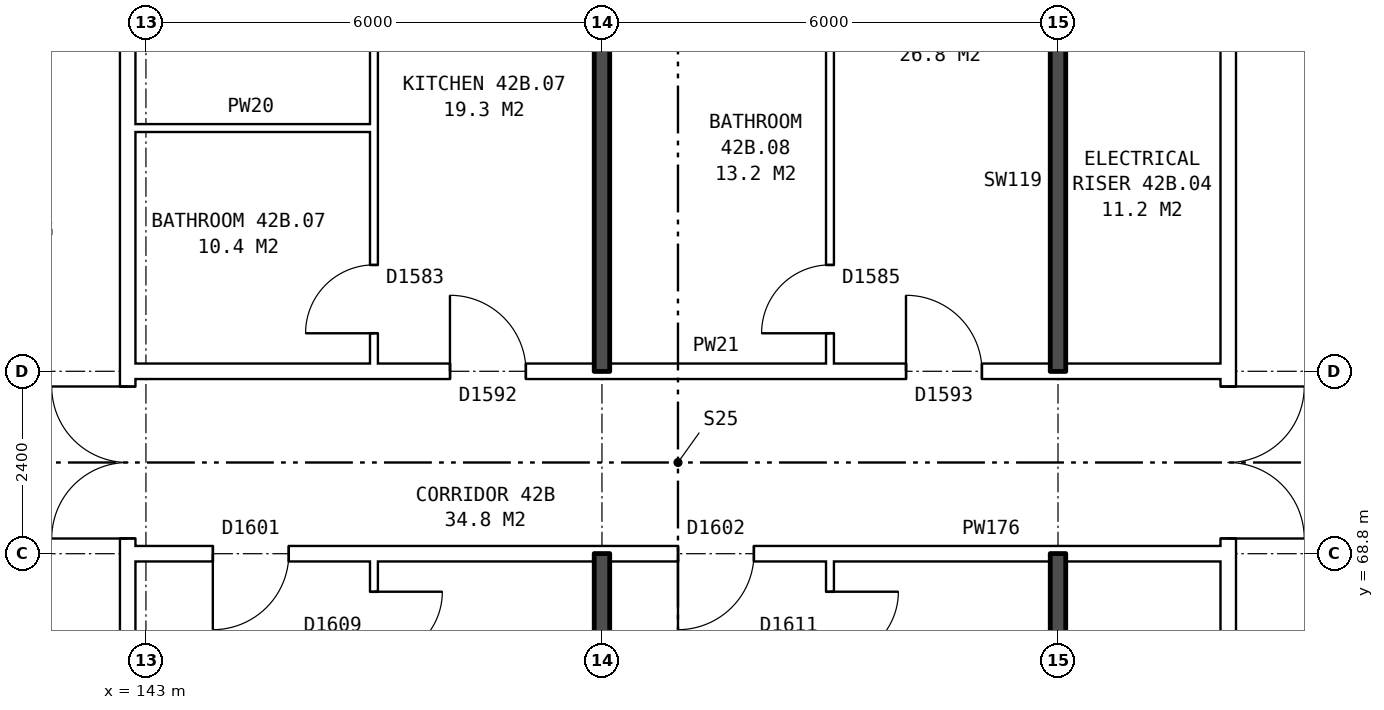
"""IFC4 building model, lengths in metres.
Left out: names, types, materials, properties, quantities, classifications, styles, units other than length and angle.
Written with IfcOpenShell. Run it as: python <this file> out.ifc"""

import sys

from ifc_helpers import new_model, si_unit, direction, frame, frame_2d, origin, place, context, subcontext, project, spatial, rectangle, extrude, element, fill, save


model = new_model("IFC4")
c1 = context("Model", 3, precision=1e-05, world=origin(), true_north=direction((0.0, 1.0)))
c2 = subcontext(c1, "Body", "Model", "MODEL_VIEW")
j1 = project(units=[si_unit("LENGTHUNIT", "METRE"), si_unit("PLANEANGLEUNIT", "RADIAN")], contexts=[c1])
p1 = place(None, origin())
s1 = spatial("IfcSite", under=j1, at=p1, CompositionType="ELEMENT")
p2 = place(p1, origin())
s2 = spatial("IfcBuilding", under=s1, at=p2, CompositionType="ELEMENT")
p3 = place(p2, frame((0.0, 0.0, 151.6)))
s3 = spatial("IfcBuildingStorey", under=s2, at=p3, CompositionType="ELEMENT", Elevation=151.6)
p4 = place(p3, frame((142.76, 63.9, 0.0), z_axis=(0.0, 0.0, 1.0), x_axis=(0.0, 1.0, 0.0)))
e1 = element("IfcWall", 1, at=p4, inside=s3, PredefinedType="PARTITIONING", context=c2, shape_type="SweptSolid", body=[
    extrude(rectangle(XDim=12.2, YDim=0.2, at=frame_2d((6.1, 0.0))), origin(), (0.0, 0.0, 1.0), 2.85),
])
p5 = place(p4, frame((5.1, 0.0, 0.0)))
e2 = element("IfcOpeningElement", 2, at=p5, cuts=e1, PredefinedType="OPENING", context=c2, shape_type="SweptSolid", body=[
    extrude(rectangle(XDim=2.0, YDim=2.1, at=frame_2d((1.0, 1.05))), frame((0.0, 0.11, 0.0), z_axis=(0.0, -1.0, 0.0), x_axis=(1.0, 0.0, 0.0)), (0.0, 0.0, 1.0), 0.22),
])
p6 = place(p3, frame((157.24, 63.9, 0.0), z_axis=(0.0, 0.0, 1.0), x_axis=(0.0, 1.0, 0.0)))
e3 = element("IfcWall", 3, at=p6, inside=s3, PredefinedType="PARTITIONING", context=c2, shape_type="SweptSolid", body=[
    extrude(rectangle(XDim=12.2, YDim=0.2, at=frame_2d((6.1, 0.0))), origin(), (0.0, 0.0, 1.0), 2.85),
])
p7 = place(p6, frame((5.1, 0.0, 0.0)))
e4 = element("IfcOpeningElement", 4, at=p7, cuts=e3, PredefinedType="OPENING", context=c2, shape_type="SweptSolid", body=[
    extrude(rectangle(XDim=2.0, YDim=2.1, at=frame_2d((1.0, 1.05))), frame((0.0, 0.11, 0.0), z_axis=(0.0, -1.0, 0.0), x_axis=(1.0, 0.0, 0.0)), (0.0, 0.0, 1.0), 0.22),
])
p8 = place(p3, frame((142.76, 68.8, 0.0), z_axis=(0.0, 0.0, 1.0), x_axis=(1.0, 0.0, 0.0)))
e5 = element("IfcWall", 5, at=p8, inside=s3, PredefinedType="PARTITIONING", context=c2, shape_type="SweptSolid", body=[
    extrude(rectangle(XDim=14.48, YDim=0.2, at=frame_2d((7.24, 0.0))), origin(), (0.0, 0.0, 1.0), 2.85),
])
p9 = place(p8, frame((1.12, 0.0, 0.0)))
e6 = element("IfcOpeningElement", 6, at=p9, cuts=e5, PredefinedType="OPENING", context=c2, shape_type="SweptSolid", body=[
    extrude(rectangle(XDim=1.0, YDim=2.1, at=frame_2d((0.5, 1.05))), frame((0.0, 0.11, 0.0), z_axis=(0.0, -1.0, 0.0), x_axis=(1.0, 0.0, 0.0)), (0.0, 0.0, 1.0), 0.22),
])
p10 = place(p8, frame((7.24, 0.0, 0.0)))
e7 = element("IfcOpeningElement", 7, at=p10, cuts=e5, PredefinedType="OPENING", context=c2, shape_type="SweptSolid", body=[
    extrude(rectangle(XDim=1.0, YDim=2.1, at=frame_2d((0.5, 1.05))), frame((0.0, 0.11, 0.0), z_axis=(0.0, -1.0, 0.0), x_axis=(1.0, 0.0, 0.0)), (0.0, 0.0, 1.0), 0.22),
])
p11 = place(p3, frame((142.76, 71.2, 0.0), z_axis=(0.0, 0.0, 1.0), x_axis=(1.0, 0.0, 0.0)))
e8 = element("IfcWall", 8, at=p11, inside=s3, PredefinedType="PARTITIONING", context=c2, shape_type="SweptSolid", body=[
    extrude(rectangle(XDim=14.48, YDim=0.2, at=frame_2d((7.24, 0.0))), origin(), (0.0, 0.0, 1.0), 2.85),
])
p12 = place(p11, frame((4.24, 0.0, 0.0)))
e9 = element("IfcOpeningElement", 9, at=p12, cuts=e8, PredefinedType="OPENING", context=c2, shape_type="SweptSolid", body=[
    extrude(rectangle(XDim=1.0, YDim=2.1, at=frame_2d((0.5, 1.05))), frame((0.0, 0.11, 0.0), z_axis=(0.0, -1.0, 0.0), x_axis=(1.0, 0.0, 0.0)), (0.0, 0.0, 1.0), 0.22),
])
p13 = place(p11, frame((10.24, 0.0, 0.0)))
e10 = element("IfcOpeningElement", 10, at=p13, cuts=e8, PredefinedType="OPENING", context=c2, shape_type="SweptSolid", body=[
    extrude(rectangle(XDim=1.0, YDim=2.1, at=frame_2d((0.5, 1.05))), frame((0.0, 0.11, 0.0), z_axis=(0.0, -1.0, 0.0), x_axis=(1.0, 0.0, 0.0)), (0.0, 0.0, 1.0), 0.22),
])
p14 = place(p3, frame((142.76, 74.4, 0.0), z_axis=(0.0, 0.0, 1.0), x_axis=(1.0, 0.0, 0.0)))
e11 = element("IfcWall", 11, at=p14, inside=s3, PredefinedType="PARTITIONING", context=c2, shape_type="SweptSolid", body=[
    extrude(rectangle(XDim=3.24, YDim=0.1, at=frame_2d((1.62, 0.0))), origin(), (0.0, 0.0, 1.0), 2.85),
])
p15 = place(p3, frame((146.0, 54.36, 0.0), z_axis=(0.0, 0.0, 1.0), x_axis=(0.0, 1.0, 0.0)))
e12 = element("IfcWall", 12, at=p15, inside=s3, PredefinedType="PARTITIONING", context=c2, shape_type="SweptSolid", body=[
    extrude(rectangle(XDim=14.34, YDim=0.1, at=frame_2d((7.17, 0.0))), origin(), (0.0, 0.0, 1.0), 2.85),
])
p16 = place(p15, frame((6.7, 0.0, 0.0)))
e13 = element("IfcOpeningElement", 13, at=p16, cuts=e12, PredefinedType="OPENING", context=c2, shape_type="SweptSolid", body=[
    extrude(rectangle(XDim=0.9, YDim=2.1, at=frame_2d((0.45, 1.05))), frame((0.0, 0.06, 0.0), z_axis=(0.0, -1.0, 0.0), x_axis=(1.0, 0.0, 0.0)), (0.0, 0.0, 1.0), 0.12),
])
p17 = place(p15, frame((13.04, 0.0, 0.0)))
e14 = element("IfcOpeningElement", 14, at=p17, cuts=e12, PredefinedType="OPENING", context=c2, shape_type="SweptSolid", body=[
    extrude(rectangle(XDim=0.9, YDim=2.1, at=frame_2d((0.45, 1.05))), frame((0.0, 0.06, 0.0), z_axis=(0.0, -1.0, 0.0), x_axis=(1.0, 0.0, 0.0)), (0.0, 0.0, 1.0), 0.12),
])
p18 = place(p3, frame((146.0, 71.3, 0.0), z_axis=(0.0, 0.0, 1.0), x_axis=(0.0, 1.0, 0.0)))
e15 = element("IfcWall", 15, at=p18, inside=s3, PredefinedType="PARTITIONING", context=c2, shape_type="SweptSolid", body=[
    extrude(rectangle(XDim=14.34, YDim=0.1, at=frame_2d((7.17, 0.0))), origin(), (0.0, 0.0, 1.0), 2.85),
])
p19 = place(p18, frame((6.74, 0.0, 0.0)))
e16 = element("IfcOpeningElement", 16, at=p19, cuts=e15, PredefinedType="OPENING", context=c2, shape_type="SweptSolid", body=[
    extrude(rectangle(XDim=0.9, YDim=2.1, at=frame_2d((0.45, 1.05))), frame((0.0, 0.06, 0.0), z_axis=(0.0, -1.0, 0.0), x_axis=(1.0, 0.0, 0.0)), (0.0, 0.0, 1.0), 0.12),
])
p20 = place(p18, frame((0.4, 0.0, 0.0)))
e17 = element("IfcOpeningElement", 17, at=p20, cuts=e15, PredefinedType="OPENING", context=c2, shape_type="SweptSolid", body=[
    extrude(rectangle(XDim=0.9, YDim=2.1, at=frame_2d((0.45, 1.05))), frame((0.0, 0.06, 0.0), z_axis=(0.0, -1.0, 0.0), x_axis=(1.0, 0.0, 0.0)), (0.0, 0.0, 1.0), 0.12),
])
for number, where, z_axis, x_axis in (
    (18, (149.0, 54.36, 0.0), (0.0, 0.0, 1.0), (0.0, 1.0, 0.0)),
    (19, (149.0, 71.2, 0.0), (0.0, 0.0, 1.0), (0.0, 1.0, 0.0)),
):
    element("IfcWall", number, at=place(p3, frame(where, z_axis=z_axis, x_axis=x_axis)), inside=s3, PredefinedType="SOLIDWALL", context=c2, shape_type="SweptSolid", body=[
        extrude(rectangle(XDim=14.44, YDim=0.2, at=frame_2d((7.22, 0.0))), origin(), (0.0, 0.0, 1.0), 2.85),
    ])
p21 = place(p3, frame((152.0, 54.36, 0.0), z_axis=(0.0, 0.0, 1.0), x_axis=(0.0, 1.0, 0.0)))
e20 = element("IfcWall", 20, at=p21, inside=s3, PredefinedType="PARTITIONING", context=c2, shape_type="SweptSolid", body=[
    extrude(rectangle(XDim=14.34, YDim=0.1, at=frame_2d((7.17, 0.0))), origin(), (0.0, 0.0, 1.0), 2.85),
])
p22 = place(p21, frame((5.5, 0.0, 0.0)))
e21 = element("IfcOpeningElement", 21, at=p22, cuts=e20, PredefinedType="OPENING", context=c2, shape_type="SweptSolid", body=[
    extrude(rectangle(XDim=0.9, YDim=2.1, at=frame_2d((0.45, 1.05))), frame((0.0, 0.06, 0.0), z_axis=(0.0, -1.0, 0.0), x_axis=(1.0, 0.0, 0.0)), (0.0, 0.0, 1.0), 0.12),
])
p23 = place(p21, frame((13.04, 0.0, 0.0)))
e22 = element("IfcOpeningElement", 22, at=p23, cuts=e20, PredefinedType="OPENING", context=c2, shape_type="SweptSolid", body=[
    extrude(rectangle(XDim=0.9, YDim=2.1, at=frame_2d((0.45, 1.05))), frame((0.0, 0.06, 0.0), z_axis=(0.0, -1.0, 0.0), x_axis=(1.0, 0.0, 0.0)), (0.0, 0.0, 1.0), 0.12),
])
p24 = place(p3, frame((152.0, 71.3, 0.0), z_axis=(0.0, 0.0, 1.0), x_axis=(0.0, 1.0, 0.0)))
e23 = element("IfcWall", 23, at=p24, inside=s3, PredefinedType="PARTITIONING", context=c2, shape_type="SweptSolid", body=[
    extrude(rectangle(XDim=14.34, YDim=0.1, at=frame_2d((7.17, 0.0))), origin(), (0.0, 0.0, 1.0), 2.85),
])
p25 = place(p24, frame((9.24, 0.0, 0.0)))
e24 = element("IfcOpeningElement", 24, at=p25, cuts=e23, PredefinedType="OPENING", context=c2, shape_type="SweptSolid", body=[
    extrude(rectangle(XDim=0.9, YDim=2.1, at=frame_2d((0.45, 1.05))), frame((0.0, 0.06, 0.0), z_axis=(0.0, -1.0, 0.0), x_axis=(1.0, 0.0, 0.0)), (0.0, 0.0, 1.0), 0.12),
])
p26 = place(p24, frame((0.4, 0.0, 0.0)))
e25 = element("IfcOpeningElement", 25, at=p26, cuts=e23, PredefinedType="OPENING", context=c2, shape_type="SweptSolid", body=[
    extrude(rectangle(XDim=0.9, YDim=2.1, at=frame_2d((0.45, 1.05))), frame((0.0, 0.06, 0.0), z_axis=(0.0, -1.0, 0.0), x_axis=(1.0, 0.0, 0.0)), (0.0, 0.0, 1.0), 0.12),
])
for number, where, z_axis, x_axis in (
    (26, (155.0, 63.8, 0.0), (0.0, 0.0, 1.0), (0.0, 1.0, 0.0)),
    (27, (155.0, 71.2, 0.0), (0.0, 0.0, 1.0), (0.0, 1.0, 0.0)),
):
    element("IfcWall", number, at=place(p3, frame(where, z_axis=z_axis, x_axis=x_axis)), inside=s3, PredefinedType="SOLIDWALL", context=c2, shape_type="SweptSolid", body=[
        extrude(rectangle(XDim=5.0, YDim=0.2, at=frame_2d((2.5, 0.0))), origin(), (0.0, 0.0, 1.0), 2.85),
    ])
p27 = place(p5, origin())
e28 = element("IfcDoor", 28, at=p27, inside=s3, OperationType="DOUBLE_DOOR_SINGLE_SWING", PredefinedType="DOOR", context=c2, shape_type="SweptSolid", body=[
    extrude(rectangle(XDim=2.0, YDim=2.1, at=frame_2d((1.0, 1.05))), frame((0.0, 0.025, 0.0), z_axis=(0.0, -1.0, 0.0), x_axis=(1.0, 0.0, 0.0)), (0.0, 0.0, 1.0), 0.05),
])
fill(e2, e28)
p28 = place(p7, frame((2.0, 0.0, 0.0), z_axis=(0.0, 0.0, 1.0), x_axis=(-1.0, 0.0, 0.0)))
e29 = element("IfcDoor", 29, at=p28, inside=s3, OperationType="DOUBLE_DOOR_SINGLE_SWING", PredefinedType="DOOR", context=c2, shape_type="SweptSolid", body=[
    extrude(rectangle(XDim=2.0, YDim=2.1, at=frame_2d((1.0, 1.05))), frame((0.0, 0.025, 0.0), z_axis=(0.0, -1.0, 0.0), x_axis=(1.0, 0.0, 0.0)), (0.0, 0.0, 1.0), 0.05),
])
fill(e4, e29)
p29 = place(p9, frame((1.0, 0.0, 0.0), z_axis=(0.0, 0.0, 1.0), x_axis=(-1.0, 0.0, 0.0)))
e30 = element("IfcDoor", 30, at=p29, inside=s3, OperationType="SINGLE_SWING_RIGHT", PredefinedType="DOOR", context=c2, shape_type="SweptSolid", body=[
    extrude(rectangle(XDim=1.0, YDim=2.1, at=frame_2d((0.5, 1.05))), frame((0.0, 0.025, 0.0), z_axis=(0.0, -1.0, 0.0), x_axis=(1.0, 0.0, 0.0)), (0.0, 0.0, 1.0), 0.05),
])
fill(e6, e30)
p30 = place(p17, frame((0.9, 0.0, 0.0), z_axis=(0.0, 0.0, 1.0), x_axis=(-1.0, 0.0, 0.0)))
e31 = element("IfcDoor", 31, at=p30, inside=s3, OperationType="SINGLE_SWING_LEFT", PredefinedType="DOOR", context=c2, shape_type="SweptSolid", body=[
    extrude(rectangle(XDim=0.9, YDim=2.1, at=frame_2d((0.45, 1.05))), frame((0.0, 0.025, 0.0), z_axis=(0.0, -1.0, 0.0), x_axis=(1.0, 0.0, 0.0)), (0.0, 0.0, 1.0), 0.05),
])
fill(e14, e31)
p31 = place(p10, frame((1.0, 0.0, 0.0), z_axis=(0.0, 0.0, 1.0), x_axis=(-1.0, 0.0, 0.0)))
e32 = element("IfcDoor", 32, at=p31, inside=s3, OperationType="SINGLE_SWING_RIGHT", PredefinedType="DOOR", context=c2, shape_type="SweptSolid", body=[
    extrude(rectangle(XDim=1.0, YDim=2.1, at=frame_2d((0.5, 1.05))), frame((0.0, 0.025, 0.0), z_axis=(0.0, -1.0, 0.0), x_axis=(1.0, 0.0, 0.0)), (0.0, 0.0, 1.0), 0.05),
])
fill(e7, e32)
p32 = place(p23, frame((0.9, 0.0, 0.0), z_axis=(0.0, 0.0, 1.0), x_axis=(-1.0, 0.0, 0.0)))
e33 = element("IfcDoor", 33, at=p32, inside=s3, OperationType="SINGLE_SWING_LEFT", PredefinedType="DOOR", context=c2, shape_type="SweptSolid", body=[
    extrude(rectangle(XDim=0.9, YDim=2.1, at=frame_2d((0.45, 1.05))), frame((0.0, 0.025, 0.0), z_axis=(0.0, -1.0, 0.0), x_axis=(1.0, 0.0, 0.0)), (0.0, 0.0, 1.0), 0.05),
])
fill(e22, e33)
p33 = place(p12, origin())
e34 = element("IfcDoor", 34, at=p33, inside=s3, OperationType="SINGLE_SWING_LEFT", PredefinedType="DOOR", context=c2, shape_type="SweptSolid", body=[
    extrude(rectangle(XDim=1.0, YDim=2.1, at=frame_2d((0.5, 1.05))), frame((0.0, 0.025, 0.0), z_axis=(0.0, -1.0, 0.0), x_axis=(1.0, 0.0, 0.0)), (0.0, 0.0, 1.0), 0.05),
])
fill(e9, e34)
p34 = place(p20, origin())
e35 = element("IfcDoor", 35, at=p34, inside=s3, OperationType="SINGLE_SWING_LEFT", PredefinedType="DOOR", context=c2, shape_type="SweptSolid", body=[
    extrude(rectangle(XDim=0.9, YDim=2.1, at=frame_2d((0.45, 1.05))), frame((0.0, 0.025, 0.0), z_axis=(0.0, -1.0, 0.0), x_axis=(1.0, 0.0, 0.0)), (0.0, 0.0, 1.0), 0.05),
])
fill(e17, e35)
p35 = place(p13, origin())
e36 = element("IfcDoor", 36, at=p35, inside=s3, OperationType="SINGLE_SWING_LEFT", PredefinedType="DOOR", context=c2, shape_type="SweptSolid", body=[
    extrude(rectangle(XDim=1.0, YDim=2.1, at=frame_2d((0.5, 1.05))), frame((0.0, 0.025, 0.0), z_axis=(0.0, -1.0, 0.0), x_axis=(1.0, 0.0, 0.0)), (0.0, 0.0, 1.0), 0.05),
])
fill(e10, e36)
p36 = place(p26, origin())
e37 = element("IfcDoor", 37, at=p36, inside=s3, OperationType="SINGLE_SWING_LEFT", PredefinedType="DOOR", context=c2, shape_type="SweptSolid", body=[
    extrude(rectangle(XDim=0.9, YDim=2.1, at=frame_2d((0.45, 1.05))), frame((0.0, 0.025, 0.0), z_axis=(0.0, -1.0, 0.0), x_axis=(1.0, 0.0, 0.0)), (0.0, 0.0, 1.0), 0.05),
])
fill(e25, e37)
save(model, sys.argv[1])
